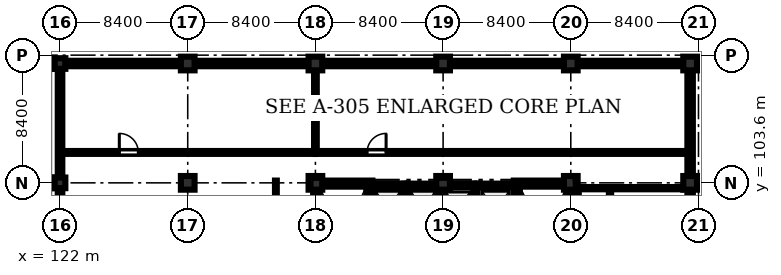
"""IFC4 building model, lengths in metres.
Left out: names, types, materials, properties, quantities, classifications, styles, units other than length and angle.
Written with IfcOpenShell. Run it as: python <this file> out.ifc"""

import sys

from ifc_helpers import new_model, si_unit, direction, frame, frame_2d, origin, origin_2d, place, context, subcontext, project, spatial, rectangle, extrude, element, fill, save


model = new_model("IFC4")
c1 = context("Model", 3, precision=1e-05, world=origin(), true_north=direction((0.0, 1.0)))
c2 = subcontext(c1, "Body", "Model", "MODEL_VIEW")
j1 = project(units=[si_unit("LENGTHUNIT", "METRE"), si_unit("PLANEANGLEUNIT", "RADIAN")], contexts=[c1])
p1 = place(None, origin())
s1 = spatial("IfcSite", under=j1, at=p1, CompositionType="ELEMENT")
p2 = place(p1, origin())
s2 = spatial("IfcBuilding", under=s1, at=p2, CompositionType="ELEMENT")
p3 = place(p2, frame((0.0, 0.0, 10.2)))
s3 = spatial("IfcBuildingStorey", under=s2, at=p3, CompositionType="ELEMENT", Elevation=10.2)
for number, where, z_axis, x_axis in (
    (1, (122.0, 103.6, 0.0), (0.0, 0.0, 1.0), (1.0, 0.0, 0.0)),
    (2, (122.0, 111.45, 0.0), (0.0, 0.0, 1.0), (1.0, 0.0, 0.0)),
):
    element("IfcColumn", number, at=place(p3, frame(where, z_axis=z_axis, x_axis=x_axis)), inside=s3, PredefinedType="COLUMN", context=c2, shape_type="SweptSolid", body=[
        extrude(rectangle(XDim=0.7, YDim=0.7, at=origin_2d()), origin(), (0.0, 0.0, 1.0), 4.26),
    ])
for number, where, z_axis, x_axis in (
    (3, (130.4, 103.6, 0.0), (0.0, 0.0, 1.0), (1.0, 0.0, 0.0)),
    (4, (130.4, 111.45, 0.0), (0.0, 0.0, 1.0), (1.0, 0.0, 0.0)),
    (5, (138.8, 103.6, 0.0), (0.0, 0.0, 1.0), (1.0, 0.0, 0.0)),
    (6, (138.8, 111.45, 0.0), (0.0, 0.0, 1.0), (1.0, 0.0, 0.0)),
    (7, (147.2, 103.6, 0.0), (0.0, 0.0, 1.0), (1.0, 0.0, 0.0)),
    (8, (147.2, 111.45, 0.0), (0.0, 0.0, 1.0), (1.0, 0.0, 0.0)),
    (9, (155.6, 103.6, 0.0), (0.0, 0.0, 1.0), (1.0, 0.0, 0.0)),
    (10, (155.6, 111.45, 0.0), (0.0, 0.0, 1.0), (1.0, 0.0, 0.0)),
    (11, (163.45, 103.6, 0.0), (0.0, 0.0, 1.0), (1.0, 0.0, 0.0)),
    (12, (163.45, 111.45, 0.0), (0.0, 0.0, 1.0), (1.0, 0.0, 0.0)),
):
    element("IfcColumn", number, at=place(p3, frame(where, z_axis=z_axis, x_axis=x_axis)), inside=s3, PredefinedType="COLUMN", context=c2, shape_type="SweptSolid", body=[
        extrude(rectangle(XDim=0.9, YDim=0.9, at=origin_2d()), origin(), (0.0, 0.0, 1.0), 4.26),
    ])
p4 = place(p3, frame((138.65, 103.55, 0.0), z_axis=(0.0, 0.0, 1.0), x_axis=(1.0, 0.0, 0.0)))
e13 = element("IfcWall", 13, at=p4, inside=s3, PredefinedType="SHEAR", context=c2, shape_type="SweptSolid", body=[
    extrude(rectangle(XDim=3.9, YDim=0.4, at=frame_2d((1.95, 0.0))), origin(), (0.0, 0.0, 1.0), 4.26),
])
p5 = place(p3, frame((138.85, 95.45, 0.0), z_axis=(0.0, 0.0, 1.0), x_axis=(0.0, 1.0, 0.0)))
e14 = element("IfcWall", 14, at=p5, inside=s3, PredefinedType="SHEAR", context=c2, shape_type="SweptSolid", body=[
    extrude(rectangle(XDim=7.9, YDim=0.4, at=frame_2d((3.95, 0.0))), origin(), (0.0, 0.0, 1.0), 4.26),
])
p6 = place(p3, frame((142.35, 95.45, 0.0), z_axis=(0.0, 0.0, 1.0), x_axis=(0.0, 1.0, 0.0)))
e15 = element("IfcWall", 15, at=p6, inside=s3, PredefinedType="SHEAR", context=c2, shape_type="SweptSolid", body=[
    extrude(rectangle(XDim=7.9, YDim=0.4, at=frame_2d((3.95, 0.0))), origin(), (0.0, 0.0, 1.0), 4.26),
])
p7 = place(p6, frame((0.22, 0.0, 0.0)))
e16 = element("IfcOpeningElement", 16, at=p7, cuts=e15, PredefinedType="OPENING", context=c2, shape_type="SweptSolid", body=[
    extrude(rectangle(XDim=1.15, YDim=2.15, at=frame_2d((0.575, 1.075))), frame((0.0, 0.21, 0.0), z_axis=(0.0, -1.0, 0.0), x_axis=(1.0, 0.0, 0.0)), (0.0, 0.0, 1.0), 0.42),
])
p8 = place(p3, frame((151.85, 103.55, 0.0), z_axis=(0.0, 0.0, 1.0), x_axis=(1.0, 0.0, 0.0)))
e17 = element("IfcWall", 17, at=p8, inside=s3, PredefinedType="SHEAR", context=c2, shape_type="SweptSolid", body=[
    extrude(rectangle(XDim=3.9, YDim=0.4, at=frame_2d((1.95, 0.0))), origin(), (0.0, 0.0, 1.0), 4.26),
])
p9 = place(p3, frame((152.05, 95.45, 0.0), z_axis=(0.0, 0.0, 1.0), x_axis=(0.0, 1.0, 0.0)))
e18 = element("IfcWall", 18, at=p9, inside=s3, PredefinedType="SHEAR", context=c2, shape_type="SweptSolid", body=[
    extrude(rectangle(XDim=7.9, YDim=0.4, at=frame_2d((3.95, 0.0))), origin(), (0.0, 0.0, 1.0), 4.26),
])
p10 = place(p9, frame((0.35, 0.0, 0.0)))
e19 = element("IfcOpeningElement", 19, at=p10, cuts=e18, PredefinedType="OPENING", context=c2, shape_type="SweptSolid", body=[
    extrude(rectangle(XDim=1.15, YDim=2.15, at=frame_2d((0.575, 1.075))), frame((0.0, 0.21, 0.0), z_axis=(0.0, -1.0, 0.0), x_axis=(1.0, 0.0, 0.0)), (0.0, 0.0, 1.0), 0.42),
])
p11 = place(p3, frame((155.55, 95.45, 0.0), z_axis=(0.0, 0.0, 1.0), x_axis=(0.0, 1.0, 0.0)))
e20 = element("IfcWall", 20, at=p11, inside=s3, PredefinedType="SHEAR", context=c2, shape_type="SweptSolid", body=[
    extrude(rectangle(XDim=7.9, YDim=0.4, at=frame_2d((3.95, 0.0))), origin(), (0.0, 0.0, 1.0), 4.26),
])
p12 = place(p3, frame((142.55, 103.425, 0.0), z_axis=(0.0, 0.0, 1.0), x_axis=(1.0, 0.0, 0.0)))
e21 = element("IfcWall", 21, at=p12, inside=s3, PredefinedType="SHEAR", context=c2, shape_type="SweptSolid", body=[
    extrude(rectangle(XDim=2.05, YDim=0.25, at=frame_2d((1.025, 0.0))), origin(), (0.0, 0.0, 1.0), 4.26),
])
p13 = place(p3, frame((144.725, 100.15, 0.0), z_axis=(0.0, 0.0, 1.0), x_axis=(0.0, 1.0, 0.0)))
e22 = element("IfcWall", 22, at=p13, inside=s3, PredefinedType="SHEAR", context=c2, shape_type="SweptSolid", body=[
    extrude(rectangle(XDim=3.4, YDim=0.25, at=frame_2d((1.7, 0.0))), origin(), (0.0, 0.0, 1.0), 4.26),
])
p14 = place(p3, frame((144.85, 103.425, 0.0), z_axis=(0.0, 0.0, 1.0), x_axis=(1.0, 0.0, 0.0)))
e23 = element("IfcWall", 23, at=p14, inside=s3, PredefinedType="SHEAR", context=c2, shape_type="SweptSolid", body=[
    extrude(rectangle(XDim=2.05, YDim=0.25, at=frame_2d((1.025, 0.0))), origin(), (0.0, 0.0, 1.0), 4.26),
])
p15 = place(p3, frame((147.025, 100.15, 0.0), z_axis=(0.0, 0.0, 1.0), x_axis=(0.0, 1.0, 0.0)))
e24 = element("IfcWall", 24, at=p15, inside=s3, PredefinedType="SHEAR", context=c2, shape_type="SweptSolid", body=[
    extrude(rectangle(XDim=3.4, YDim=0.25, at=frame_2d((1.7, 0.0))), origin(), (0.0, 0.0, 1.0), 4.26),
])
p16 = place(p3, frame((147.15, 103.425, 0.0), z_axis=(0.0, 0.0, 1.0), x_axis=(1.0, 0.0, 0.0)))
e25 = element("IfcWall", 25, at=p16, inside=s3, PredefinedType="SHEAR", context=c2, shape_type="SweptSolid", body=[
    extrude(rectangle(XDim=2.05, YDim=0.25, at=frame_2d((1.025, 0.0))), origin(), (0.0, 0.0, 1.0), 4.26),
])
p17 = place(p3, frame((149.325, 100.35, 0.0), z_axis=(0.0, 0.0, 1.0), x_axis=(0.0, 1.0, 0.0)))
e26 = element("IfcWall", 26, at=p17, inside=s3, PredefinedType="SHEAR", context=c2, shape_type="SweptSolid", body=[
    extrude(rectangle(XDim=3.2, YDim=0.25, at=frame_2d((1.6, 0.0))), origin(), (0.0, 0.0, 1.0), 4.26),
])
p18 = place(p3, frame((149.45, 103.425, 0.0), z_axis=(0.0, 0.0, 1.0), x_axis=(1.0, 0.0, 0.0)))
e27 = element("IfcWall", 27, at=p18, inside=s3, PredefinedType="SHEAR", context=c2, shape_type="SweptSolid", body=[
    extrude(rectangle(XDim=2.4, YDim=0.25, at=frame_2d((1.2, 0.0))), origin(), (0.0, 0.0, 1.0), 4.26),
])
p19 = place(p3, frame((122.35, 111.45, 0.0), z_axis=(0.0, 0.0, 1.0), x_axis=(1.0, 0.0, 0.0)))
e28 = element("IfcWall", 28, at=p19, inside=s3, PredefinedType="STANDARD", context=c2, shape_type="SweptSolid", body=[
    extrude(rectangle(XDim=7.6, YDim=0.36, at=frame_2d((3.8, 0.0))), origin(), (0.0, 0.0, 1.0), 3.51),
])
p20 = place(p19, frame((1.3, 0.0, 1.1)))
e29 = element("IfcOpeningElement", 29, at=p20, cuts=e28, PredefinedType="OPENING", context=c2, shape_type="SweptSolid", body=[
    extrude(rectangle(XDim=1.2, YDim=1.8, at=frame_2d((0.6, 0.9))), frame((0.0, 0.19, 0.0), z_axis=(0.0, -1.0, 0.0), x_axis=(1.0, 0.0, 0.0)), (0.0, 0.0, 1.0), 0.38),
])
p21 = place(p19, frame((5.1, 0.0, 1.1)))
e30 = element("IfcOpeningElement", 30, at=p21, cuts=e28, PredefinedType="OPENING", context=c2, shape_type="SweptSolid", body=[
    extrude(rectangle(XDim=1.2, YDim=1.8, at=frame_2d((0.6, 0.9))), frame((0.0, 0.19, 0.0), z_axis=(0.0, -1.0, 0.0), x_axis=(1.0, 0.0, 0.0)), (0.0, 0.0, 1.0), 0.38),
])
p22 = place(p3, frame((130.85, 111.45, 0.0), z_axis=(0.0, 0.0, 1.0), x_axis=(1.0, 0.0, 0.0)))
e31 = element("IfcWall", 31, at=p22, inside=s3, PredefinedType="STANDARD", context=c2, shape_type="SweptSolid", body=[
    extrude(rectangle(XDim=7.5, YDim=0.36, at=frame_2d((3.75, 0.0))), origin(), (0.0, 0.0, 1.0), 3.51),
])
p23 = place(p22, frame((1.3, 0.0, 1.1)))
e32 = element("IfcOpeningElement", 32, at=p23, cuts=e31, PredefinedType="OPENING", context=c2, shape_type="SweptSolid", body=[
    extrude(rectangle(XDim=1.2, YDim=1.8, at=frame_2d((0.6, 0.9))), frame((0.0, 0.19, 0.0), z_axis=(0.0, -1.0, 0.0), x_axis=(1.0, 0.0, 0.0)), (0.0, 0.0, 1.0), 0.38),
])
p24 = place(p22, frame((5.1, 0.0, 1.1)))
e33 = element("IfcOpeningElement", 33, at=p24, cuts=e31, PredefinedType="OPENING", context=c2, shape_type="SweptSolid", body=[
    extrude(rectangle(XDim=1.2, YDim=1.8, at=frame_2d((0.6, 0.9))), frame((0.0, 0.19, 0.0), z_axis=(0.0, -1.0, 0.0), x_axis=(1.0, 0.0, 0.0)), (0.0, 0.0, 1.0), 0.38),
])
p25 = place(p3, frame((139.25, 111.45, 0.0), z_axis=(0.0, 0.0, 1.0), x_axis=(1.0, 0.0, 0.0)))
e34 = element("IfcWall", 34, at=p25, inside=s3, PredefinedType="STANDARD", context=c2, shape_type="SweptSolid", body=[
    extrude(rectangle(XDim=7.5, YDim=0.36, at=frame_2d((3.75, 0.0))), origin(), (0.0, 0.0, 1.0), 3.51),
])
p26 = place(p25, frame((1.3, 0.0, 1.1)))
e35 = element("IfcOpeningElement", 35, at=p26, cuts=e34, PredefinedType="OPENING", context=c2, shape_type="SweptSolid", body=[
    extrude(rectangle(XDim=1.2, YDim=1.8, at=frame_2d((0.6, 0.9))), frame((0.0, 0.19, 0.0), z_axis=(0.0, -1.0, 0.0), x_axis=(1.0, 0.0, 0.0)), (0.0, 0.0, 1.0), 0.38),
])
p27 = place(p25, frame((5.1, 0.0, 1.1)))
e36 = element("IfcOpeningElement", 36, at=p27, cuts=e34, PredefinedType="OPENING", context=c2, shape_type="SweptSolid", body=[
    extrude(rectangle(XDim=1.2, YDim=1.8, at=frame_2d((0.6, 0.9))), frame((0.0, 0.19, 0.0), z_axis=(0.0, -1.0, 0.0), x_axis=(1.0, 0.0, 0.0)), (0.0, 0.0, 1.0), 0.38),
])
p28 = place(p3, frame((147.65, 111.45, 0.0), z_axis=(0.0, 0.0, 1.0), x_axis=(1.0, 0.0, 0.0)))
e37 = element("IfcWall", 37, at=p28, inside=s3, PredefinedType="STANDARD", context=c2, shape_type="SweptSolid", body=[
    extrude(rectangle(XDim=7.5, YDim=0.36, at=frame_2d((3.75, 0.0))), origin(), (0.0, 0.0, 1.0), 3.51),
])
p29 = place(p28, frame((1.3, 0.0, 1.1)))
e38 = element("IfcOpeningElement", 38, at=p29, cuts=e37, PredefinedType="OPENING", context=c2, shape_type="SweptSolid", body=[
    extrude(rectangle(XDim=1.2, YDim=1.8, at=frame_2d((0.6, 0.9))), frame((0.0, 0.19, 0.0), z_axis=(0.0, -1.0, 0.0), x_axis=(1.0, 0.0, 0.0)), (0.0, 0.0, 1.0), 0.38),
])
p30 = place(p28, frame((5.1, 0.0, 1.1)))
e39 = element("IfcOpeningElement", 39, at=p30, cuts=e37, PredefinedType="OPENING", context=c2, shape_type="SweptSolid", body=[
    extrude(rectangle(XDim=1.2, YDim=1.8, at=frame_2d((0.6, 0.9))), frame((0.0, 0.19, 0.0), z_axis=(0.0, -1.0, 0.0), x_axis=(1.0, 0.0, 0.0)), (0.0, 0.0, 1.0), 0.38),
])
p31 = place(p3, frame((156.05, 111.45, 0.0), z_axis=(0.0, 0.0, 1.0), x_axis=(1.0, 0.0, 0.0)))
e40 = element("IfcWall", 40, at=p31, inside=s3, PredefinedType="STANDARD", context=c2, shape_type="SweptSolid", body=[
    extrude(rectangle(XDim=6.95, YDim=0.36, at=frame_2d((3.475, 0.0))), origin(), (0.0, 0.0, 1.0), 3.51),
])
p32 = place(p31, frame((1.3, 0.0, 1.1)))
e41 = element("IfcOpeningElement", 41, at=p32, cuts=e40, PredefinedType="OPENING", context=c2, shape_type="SweptSolid", body=[
    extrude(rectangle(XDim=1.2, YDim=1.8, at=frame_2d((0.6, 0.9))), frame((0.0, 0.19, 0.0), z_axis=(0.0, -1.0, 0.0), x_axis=(1.0, 0.0, 0.0)), (0.0, 0.0, 1.0), 0.38),
])
p33 = place(p31, frame((5.1, 0.0, 1.1)))
e42 = element("IfcOpeningElement", 42, at=p33, cuts=e40, PredefinedType="OPENING", context=c2, shape_type="SweptSolid", body=[
    extrude(rectangle(XDim=1.2, YDim=1.8, at=frame_2d((0.6, 0.9))), frame((0.0, 0.19, 0.0), z_axis=(0.0, -1.0, 0.0), x_axis=(1.0, 0.0, 0.0)), (0.0, 0.0, 1.0), 0.38),
])
p34 = place(p3, frame((163.45, 103.15, 0.0), z_axis=(0.0, 0.0, 1.0), x_axis=(0.0, -1.0, 0.0)))
e43 = element("IfcWall", 43, at=p34, inside=s3, PredefinedType="STANDARD", context=c2, shape_type="SweptSolid", body=[
    extrude(rectangle(XDim=7.5, YDim=0.36, at=frame_2d((3.75, 0.0))), origin(), (0.0, 0.0, 1.0), 3.51),
])
p35 = place(p34, frame((1.15, 0.0, 1.1)))
e44 = element("IfcOpeningElement", 44, at=p35, cuts=e43, PredefinedType="OPENING", context=c2, shape_type="SweptSolid", body=[
    extrude(rectangle(XDim=1.4, YDim=1.4, at=frame_2d((0.7, 0.7))), frame((0.0, 0.19, 0.0), z_axis=(0.0, -1.0, 0.0), x_axis=(1.0, 0.0, 0.0)), (0.0, 0.0, 1.0), 0.38),
])
p36 = place(p3, frame((163.45, 111.0, 0.0), z_axis=(0.0, 0.0, 1.0), x_axis=(0.0, -1.0, 0.0)))
e45 = element("IfcWall", 45, at=p36, inside=s3, PredefinedType="STANDARD", context=c2, shape_type="SweptSolid", body=[
    extrude(rectangle(XDim=6.95, YDim=0.36, at=frame_2d((3.475, 0.0))), origin(), (0.0, 0.0, 1.0), 3.51),
])
p37 = place(p36, frame((1.15, 0.0, 1.1)))
e46 = element("IfcOpeningElement", 46, at=p37, cuts=e45, PredefinedType="OPENING", context=c2, shape_type="SweptSolid", body=[
    extrude(rectangle(XDim=1.8, YDim=1.8, at=frame_2d((0.9, 0.9))), frame((0.0, 0.19, 0.0), z_axis=(0.0, -1.0, 0.0), x_axis=(1.0, 0.0, 0.0)), (0.0, 0.0, 1.0), 0.38),
])
p38 = place(p3, frame((122.0, 95.55, 0.0), z_axis=(0.0, 0.0, 1.0), x_axis=(0.0, 1.0, 0.0)))
e47 = element("IfcWall", 47, at=p38, inside=s3, PredefinedType="STANDARD", context=c2, shape_type="SweptSolid", body=[
    extrude(rectangle(XDim=7.7, YDim=0.3, at=frame_2d((3.85, 0.0))), origin(), (0.0, 0.0, 1.0), 3.51),
])
p39 = place(p3, frame((122.0, 103.95, 0.0), z_axis=(0.0, 0.0, 1.0), x_axis=(0.0, 1.0, 0.0)))
e48 = element("IfcWall", 48, at=p39, inside=s3, PredefinedType="STANDARD", context=c2, shape_type="SweptSolid", body=[
    extrude(rectangle(XDim=7.15, YDim=0.3, at=frame_2d((3.575, 0.0))), origin(), (0.0, 0.0, 1.0), 3.51),
])
p40 = place(p3, frame((158.18, 94.68, 0.0), z_axis=(0.0, 0.0, 1.0), x_axis=(0.0, 1.0, 0.0)))
e49 = element("IfcWall", 49, at=p40, inside=s3, PredefinedType="PARTITIONING", context=c2, shape_type="SweptSolid", body=[
    extrude(rectangle(XDim=8.57, YDim=0.15, at=frame_2d((4.285, 0.0))), origin(), (0.0, 0.0, 1.0), 4.26),
])
p41 = place(p40, frame((0.8, 0.0, 0.0)))
e50 = element("IfcOpeningElement", 50, at=p41, cuts=e49, PredefinedType="OPENING", context=c2, shape_type="SweptSolid", body=[
    extrude(rectangle(XDim=1.0, YDim=2.12, at=frame_2d((0.5, 1.06))), frame((0.0, 0.085, 0.0), z_axis=(0.0, -1.0, 0.0), x_axis=(1.0, 0.0, 0.0)), (0.0, 0.0, 1.0), 0.17),
])
p42 = place(p40, frame((3.5, 0.0, 0.0)))
e51 = element("IfcOpeningElement", 51, at=p42, cuts=e49, PredefinedType="OPENING", context=c2, shape_type="SweptSolid", body=[
    extrude(rectangle(XDim=0.92, YDim=2.1, at=frame_2d((0.46, 1.05))), frame((0.0, 0.085, 0.0), z_axis=(0.0, -1.0, 0.0), x_axis=(1.0, 0.0, 0.0)), (0.0, 0.0, 1.0), 0.17),
])
p43 = place(p40, frame((6.4, 0.0, 0.0)))
e52 = element("IfcOpeningElement", 52, at=p43, cuts=e49, PredefinedType="OPENING", context=c2, shape_type="SweptSolid", body=[
    extrude(rectangle(XDim=0.92, YDim=2.1, at=frame_2d((0.46, 1.05))), frame((0.0, 0.085, 0.0), z_axis=(0.0, -1.0, 0.0), x_axis=(1.0, 0.0, 0.0)), (0.0, 0.0, 1.0), 0.17),
])
p44 = place(p3, frame((156.05, 103.25, 0.0), z_axis=(0.0, 0.0, 1.0), x_axis=(1.0, 0.0, 0.0)))
e53 = element("IfcWall", 53, at=p44, inside=s3, PredefinedType="PARTITIONING", context=c2, shape_type="SweptSolid", body=[
    extrude(rectangle(XDim=7.15, YDim=0.15, at=frame_2d((3.575, 0.0))), origin(), (0.0, 0.0, 1.0), 4.26),
])
p45 = place(p3, frame((156.05, 94.68, 0.0), z_axis=(0.0, 0.0, 1.0), x_axis=(0.0, 1.0, 0.0)))
e54 = element("IfcWall", 54, at=p45, inside=s3, PredefinedType="PARTITIONING", context=c2, shape_type="SweptSolid", body=[
    extrude(rectangle(XDim=8.57, YDim=0.15, at=frame_2d((4.285, 0.0))), origin(), (0.0, 0.0, 1.0), 4.26),
])
p46 = place(p3, frame((136.2, 94.68, 0.0), z_axis=(0.0, 0.0, 1.0), x_axis=(0.0, 1.0, 0.0)))
e55 = element("IfcWall", 55, at=p46, inside=s3, PredefinedType="PARTITIONING", context=c2, shape_type="SweptSolid", body=[
    extrude(rectangle(XDim=9.07, YDim=0.12, at=frame_2d((4.535, 0.0))), origin(), (0.0, 0.0, 1.0), 4.26),
])
p47 = place(p3, frame((122.15, 105.6, 0.0), z_axis=(0.0, 0.0, 1.0), x_axis=(1.0, 0.0, 0.0)))
e56 = element("IfcWall", 56, at=p47, inside=s3, PredefinedType="SOLIDWALL", context=c2, shape_type="SweptSolid", body=[
    extrude(rectangle(XDim=16.65, YDim=0.19, at=frame_2d((8.325, 0.0))), origin(), (0.0, 0.0, 1.0), 4.26),
])
p48 = place(p47, frame((3.75, 0.0, 0.0)))
e57 = element("IfcOpeningElement", 57, at=p48, cuts=e56, PredefinedType="OPENING", context=c2, shape_type="SweptSolid", body=[
    extrude(rectangle(XDim=1.25, YDim=2.2, at=frame_2d((0.625, 1.1))), frame((0.0, 0.105, 0.0), z_axis=(0.0, -1.0, 0.0), x_axis=(1.0, 0.0, 0.0)), (0.0, 0.0, 1.0), 0.21),
])
p49 = place(p3, frame((138.8, 105.6, 0.0), z_axis=(0.0, 0.0, 1.0), x_axis=(1.0, 0.0, 0.0)))
e58 = element("IfcWall", 58, at=p49, inside=s3, PredefinedType="SOLIDWALL", context=c2, shape_type="SweptSolid", body=[
    extrude(rectangle(XDim=24.55, YDim=0.19, at=frame_2d((12.275, 0.0))), origin(), (0.0, 0.0, 1.0), 4.26),
])
p50 = place(p49, frame((3.4, 0.0, 0.0)))
e59 = element("IfcOpeningElement", 59, at=p50, cuts=e58, PredefinedType="OPENING", context=c2, shape_type="SweptSolid", body=[
    extrude(rectangle(XDim=1.25, YDim=2.2, at=frame_2d((0.625, 1.1))), frame((0.0, 0.105, 0.0), z_axis=(0.0, -1.0, 0.0), x_axis=(1.0, 0.0, 0.0)), (0.0, 0.0, 1.0), 0.21),
])
p51 = place(p3, frame((138.8, 105.6, 0.0), z_axis=(0.0, 0.0, 1.0), x_axis=(0.0, 1.0, 0.0)))
e60 = element("IfcWall", 60, at=p51, inside=s3, PredefinedType="STANDARD", context=c2, shape_type="SweptSolid", body=[
    extrude(rectangle(XDim=5.75, YDim=0.18, at=frame_2d((2.875, 0.0))), origin(), (0.0, 0.0, 1.0), 3.51),
])
p52 = place(p20, origin())
e61 = element("IfcWindow", 61, at=p52, inside=s3, PartitioningType="SINGLE_PANEL", PredefinedType="WINDOW", context=c2, shape_type="SweptSolid", body=[
    extrude(rectangle(XDim=1.2, YDim=1.8, at=frame_2d((0.6, 0.9))), frame((0.0, 0.03, 0.0), z_axis=(0.0, -1.0, 0.0), x_axis=(1.0, 0.0, 0.0)), (0.0, 0.0, 1.0), 0.06),
])
fill(e29, e61)
p53 = place(p21, origin())
e62 = element("IfcWindow", 62, at=p53, inside=s3, PartitioningType="SINGLE_PANEL", PredefinedType="WINDOW", context=c2, shape_type="SweptSolid", body=[
    extrude(rectangle(XDim=1.2, YDim=1.8, at=frame_2d((0.6, 0.9))), frame((0.0, 0.03, 0.0), z_axis=(0.0, -1.0, 0.0), x_axis=(1.0, 0.0, 0.0)), (0.0, 0.0, 1.0), 0.06),
])
fill(e30, e62)
p54 = place(p23, origin())
e63 = element("IfcWindow", 63, at=p54, inside=s3, PartitioningType="SINGLE_PANEL", PredefinedType="WINDOW", context=c2, shape_type="SweptSolid", body=[
    extrude(rectangle(XDim=1.2, YDim=1.8, at=frame_2d((0.6, 0.9))), frame((0.0, 0.03, 0.0), z_axis=(0.0, -1.0, 0.0), x_axis=(1.0, 0.0, 0.0)), (0.0, 0.0, 1.0), 0.06),
])
fill(e32, e63)
p55 = place(p24, origin())
e64 = element("IfcWindow", 64, at=p55, inside=s3, PartitioningType="SINGLE_PANEL", PredefinedType="WINDOW", context=c2, shape_type="SweptSolid", body=[
    extrude(rectangle(XDim=1.2, YDim=1.8, at=frame_2d((0.6, 0.9))), frame((0.0, 0.03, 0.0), z_axis=(0.0, -1.0, 0.0), x_axis=(1.0, 0.0, 0.0)), (0.0, 0.0, 1.0), 0.06),
])
fill(e33, e64)
p56 = place(p26, origin())
e65 = element("IfcWindow", 65, at=p56, inside=s3, PartitioningType="SINGLE_PANEL", PredefinedType="WINDOW", context=c2, shape_type="SweptSolid", body=[
    extrude(rectangle(XDim=1.2, YDim=1.8, at=frame_2d((0.6, 0.9))), frame((0.0, 0.03, 0.0), z_axis=(0.0, -1.0, 0.0), x_axis=(1.0, 0.0, 0.0)), (0.0, 0.0, 1.0), 0.06),
])
fill(e35, e65)
p57 = place(p27, origin())
e66 = element("IfcWindow", 66, at=p57, inside=s3, PartitioningType="SINGLE_PANEL", PredefinedType="WINDOW", context=c2, shape_type="SweptSolid", body=[
    extrude(rectangle(XDim=1.2, YDim=1.8, at=frame_2d((0.6, 0.9))), frame((0.0, 0.03, 0.0), z_axis=(0.0, -1.0, 0.0), x_axis=(1.0, 0.0, 0.0)), (0.0, 0.0, 1.0), 0.06),
])
fill(e36, e66)
p58 = place(p29, origin())
e67 = element("IfcWindow", 67, at=p58, inside=s3, PartitioningType="SINGLE_PANEL", PredefinedType="WINDOW", context=c2, shape_type="SweptSolid", body=[
    extrude(rectangle(XDim=1.2, YDim=1.8, at=frame_2d((0.6, 0.9))), frame((0.0, 0.03, 0.0), z_axis=(0.0, -1.0, 0.0), x_axis=(1.0, 0.0, 0.0)), (0.0, 0.0, 1.0), 0.06),
])
fill(e38, e67)
p59 = place(p30, origin())
e68 = element("IfcWindow", 68, at=p59, inside=s3, PartitioningType="SINGLE_PANEL", PredefinedType="WINDOW", context=c2, shape_type="SweptSolid", body=[
    extrude(rectangle(XDim=1.2, YDim=1.8, at=frame_2d((0.6, 0.9))), frame((0.0, 0.03, 0.0), z_axis=(0.0, -1.0, 0.0), x_axis=(1.0, 0.0, 0.0)), (0.0, 0.0, 1.0), 0.06),
])
fill(e39, e68)
p60 = place(p32, origin())
e69 = element("IfcWindow", 69, at=p60, inside=s3, PartitioningType="SINGLE_PANEL", PredefinedType="WINDOW", context=c2, shape_type="SweptSolid", body=[
    extrude(rectangle(XDim=1.2, YDim=1.8, at=frame_2d((0.6, 0.9))), frame((0.0, 0.03, 0.0), z_axis=(0.0, -1.0, 0.0), x_axis=(1.0, 0.0, 0.0)), (0.0, 0.0, 1.0), 0.06),
])
fill(e41, e69)
p61 = place(p33, origin())
e70 = element("IfcWindow", 70, at=p61, inside=s3, PartitioningType="SINGLE_PANEL", PredefinedType="WINDOW", context=c2, shape_type="SweptSolid", body=[
    extrude(rectangle(XDim=1.2, YDim=1.8, at=frame_2d((0.6, 0.9))), frame((0.0, 0.03, 0.0), z_axis=(0.0, -1.0, 0.0), x_axis=(1.0, 0.0, 0.0)), (0.0, 0.0, 1.0), 0.06),
])
fill(e42, e70)
p62 = place(p37, origin())
e71 = element("IfcWindow", 71, at=p62, inside=s3, PartitioningType="DOUBLE_PANEL_VERTICAL", PredefinedType="WINDOW", context=c2, shape_type="SweptSolid", body=[
    extrude(rectangle(XDim=1.8, YDim=1.8, at=frame_2d((0.9, 0.9))), frame((0.0, 0.03, 0.0), z_axis=(0.0, -1.0, 0.0), x_axis=(1.0, 0.0, 0.0)), (0.0, 0.0, 1.0), 0.06),
])
fill(e46, e71)
p63 = place(p48, origin())
e72 = element("IfcDoor", 72, at=p63, inside=s3, OperationType="SINGLE_SWING_LEFT", PredefinedType="DOOR", context=c2, shape_type="SweptSolid", body=[
    extrude(rectangle(XDim=1.25, YDim=2.2, at=frame_2d((0.625, 1.1))), frame((0.0, 0.025, 0.0), z_axis=(0.0, -1.0, 0.0), x_axis=(1.0, 0.0, 0.0)), (0.0, 0.0, 1.0), 0.05),
])
fill(e57, e72)
p64 = place(p50, origin())
e73 = element("IfcDoor", 73, at=p64, inside=s3, OperationType="SINGLE_SWING_RIGHT", PredefinedType="DOOR", context=c2, shape_type="SweptSolid", body=[
    extrude(rectangle(XDim=1.25, YDim=2.2, at=frame_2d((0.625, 1.1))), frame((0.0, 0.025, 0.0), z_axis=(0.0, -1.0, 0.0), x_axis=(1.0, 0.0, 0.0)), (0.0, 0.0, 1.0), 0.05),
])
fill(e59, e73)
save(model, sys.argv[1])
